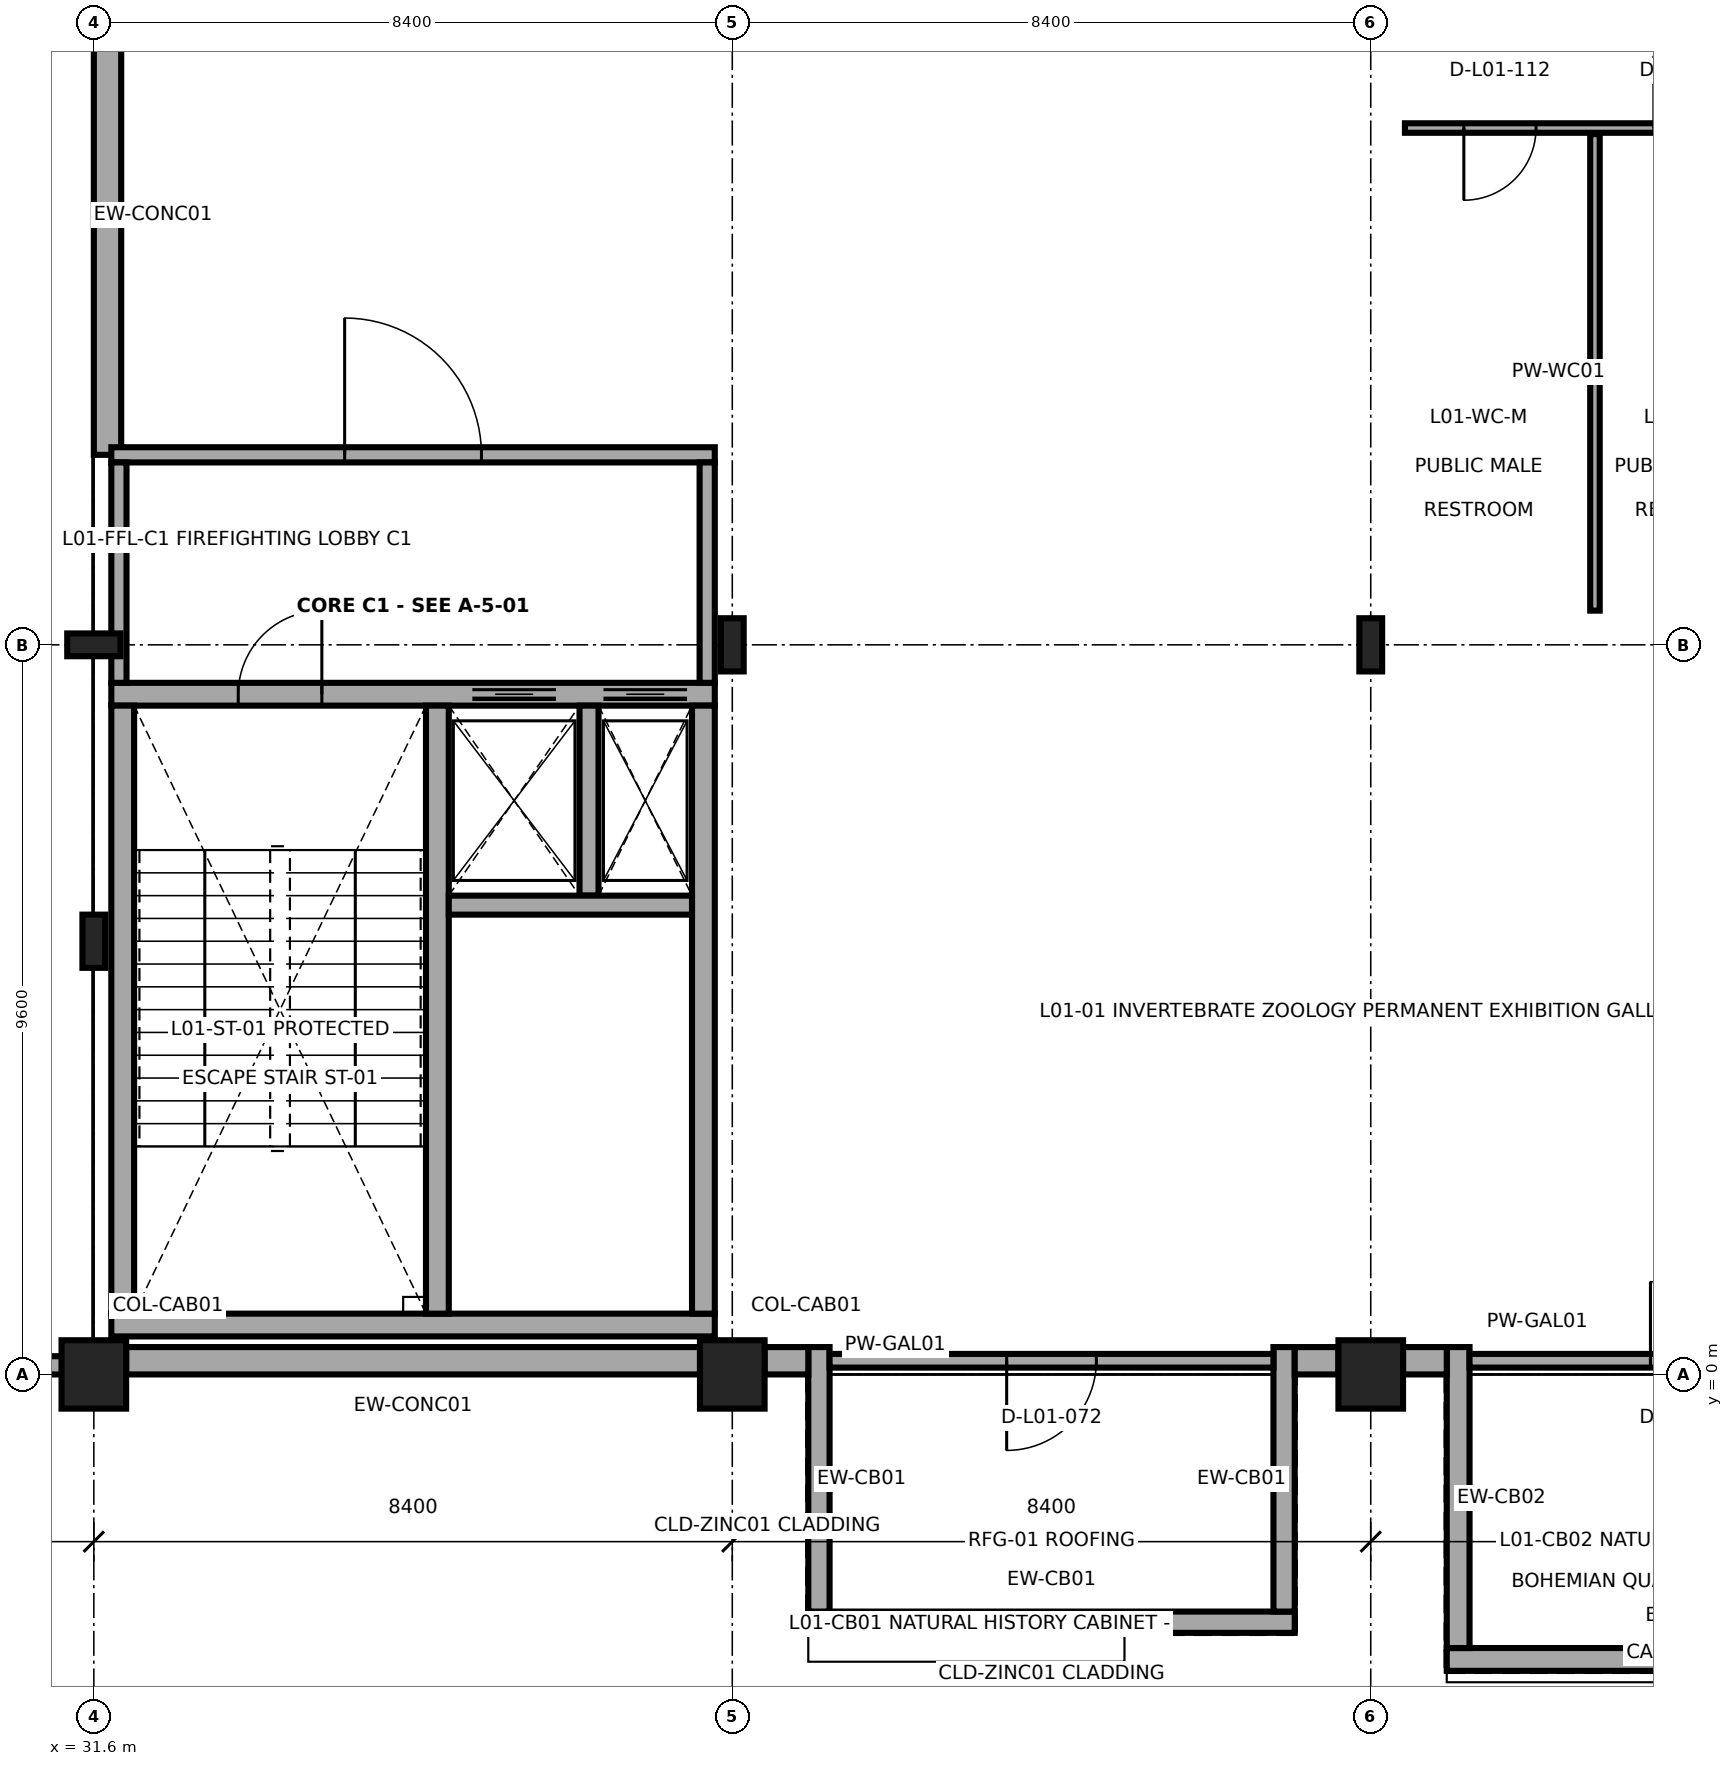
"""IFC4 building model, lengths in metres.
Left out: names, types, materials, properties, quantities, classifications, styles, units other than length and angle.
Written with IfcOpenShell. Run it as: python <this file> out.ifc"""

import sys

from ifc_helpers import new_model, si_unit, direction, frame, frame_2d, origin, origin_2d, place, context, subcontext, project, spatial, rectangle, i_section, extrude, element, fill, save


model = new_model("IFC4")
c1 = context("Model", 3, precision=1e-05, world=origin(), true_north=direction((0.0, 1.0)))
c2 = subcontext(c1, "Body", "Model", "MODEL_VIEW")
j1 = project(units=[si_unit("LENGTHUNIT", "METRE"), si_unit("PLANEANGLEUNIT", "RADIAN")], contexts=[c1])
p1 = place(None, origin())
s1 = spatial("IfcSite", under=j1, at=p1, CompositionType="ELEMENT")
p2 = place(p1, origin())
s2 = spatial("IfcBuilding", under=s1, at=p2, CompositionType="ELEMENT")
p3 = place(p2, frame((0.0, 0.0, 8.4)))
s3 = spatial("IfcBuildingStorey", under=s2, at=p3, CompositionType="ELEMENT", Elevation=8.4)
p4 = place(p3, frame((31.6, 0.0, 0.0), z_axis=(0.0, 0.0, 1.0), x_axis=(1.0, 0.0, 0.0)))
e1 = element("IfcColumn", 1, at=p4, inside=s3, PredefinedType="COLUMN", context=c2, shape_type="SweptSolid", body=[
    extrude(rectangle(XDim=0.85, YDim=0.9, at=origin_2d()), origin(), (0.0, 0.0, 1.0), 4.5),
])
p5 = place(p3, frame((31.6, 9.6, 0.0), z_axis=(0.0, 0.0, 1.0), x_axis=(0.0, 1.0, 0.0)))
e2 = element("IfcColumn", 2, at=p5, inside=s3, PredefinedType="COLUMN", context=c2, shape_type="SweptSolid", body=[
    extrude(i_section(OverallWidth=0.3, OverallDepth=0.7, WebThickness=0.017, FlangeThickness=0.032, FilletRadius=0.027, at=origin_2d()), origin(), (0.0, 0.0, 1.0), 4.5),
])
p6 = place(p3, frame((40.0, 0.0, 0.0), z_axis=(0.0, 0.0, 1.0), x_axis=(1.0, 0.0, 0.0)))
e3 = element("IfcColumn", 3, at=p6, inside=s3, PredefinedType="COLUMN", context=c2, shape_type="SweptSolid", body=[
    extrude(rectangle(XDim=0.85, YDim=0.9, at=origin_2d()), origin(), (0.0, 0.0, 1.0), 4.5),
])
p7 = place(p3, frame((40.0, 9.6, 0.0), z_axis=(0.0, 0.0, 1.0), x_axis=(1.0, 0.0, 0.0)))
e4 = element("IfcColumn", 4, at=p7, inside=s3, PredefinedType="COLUMN", context=c2, shape_type="SweptSolid", body=[
    extrude(i_section(OverallWidth=0.3, OverallDepth=0.7, WebThickness=0.017, FlangeThickness=0.032, FilletRadius=0.027, at=origin_2d()), origin(), (0.0, 0.0, 1.0), 4.5),
])
p8 = place(p3, frame((48.4, 0.0, 0.0), z_axis=(0.0, 0.0, 1.0), x_axis=(1.0, 0.0, 0.0)))
e5 = element("IfcColumn", 5, at=p8, inside=s3, PredefinedType="COLUMN", context=c2, shape_type="SweptSolid", body=[
    extrude(rectangle(XDim=0.85, YDim=0.9, at=origin_2d()), origin(), (0.0, 0.0, 1.0), 4.5),
])
for number, where, z_axis, x_axis in (
    (6, (48.4, 9.6, 0.0), (0.0, 0.0, 1.0), (1.0, 0.0, 0.0)),
    (7, (31.6, 5.7, 0.0), (0.0, 0.0, 1.0), (1.0, 0.0, 0.0)),
):
    element("IfcColumn", number, at=place(p3, frame(where, z_axis=z_axis, x_axis=x_axis)), inside=s3, PredefinedType="COLUMN", context=c2, shape_type="SweptSolid", body=[
        extrude(i_section(OverallWidth=0.3, OverallDepth=0.7, WebThickness=0.017, FlangeThickness=0.032, FilletRadius=0.027, at=origin_2d()), origin(), (0.0, 0.0, 1.0), 4.5),
    ])
p9 = place(p3, frame((41.0, -3.26, 0.0), z_axis=(0.0, 0.0, 1.0), x_axis=(1.0, 0.0, 0.0)))
e8 = element("IfcWall", 8, at=p9, inside=s3, PredefinedType="SOLIDWALL", context=c2, shape_type="SweptSolid", body=[
    extrude(rectangle(XDim=6.4, YDim=0.28, at=frame_2d((3.2, 0.0))), origin(), (0.0, 0.0, 1.0), 2.99),
])
for number, where, z_axis, x_axis in (
    (9, (41.14, 0.36, 0.0), (0.0, 0.0, 1.0), (0.0, -1.0, 0.0)),
    (10, (47.26, -3.12, 0.0), (0.0, 0.0, 1.0), (0.0, 1.0, 0.0)),
):
    element("IfcWall", number, at=place(p3, frame(where, z_axis=z_axis, x_axis=x_axis)), inside=s3, PredefinedType="SOLIDWALL", context=c2, shape_type="SweptSolid", body=[
        extrude(rectangle(XDim=3.48, YDim=0.28, at=frame_2d((1.74, 0.0))), origin(), (0.0, 0.0, 1.0), 2.99),
    ])
p10 = place(p3, frame((49.4, -3.75, 0.0), z_axis=(0.0, 0.0, 1.0), x_axis=(1.0, 0.0, 0.0)))
e11 = element("IfcWall", 11, at=p10, inside=s3, PredefinedType="SOLIDWALL", context=c2, shape_type="SweptSolid", body=[
    extrude(rectangle(XDim=6.4, YDim=0.3, at=frame_2d((3.2, 0.0))), origin(), (0.0, 0.0, 1.0), 2.99),
])
p11 = place(p3, frame((49.55, 0.36, 0.0), z_axis=(0.0, 0.0, 1.0), x_axis=(0.0, -1.0, 0.0)))
e12 = element("IfcWall", 12, at=p11, inside=s3, PredefinedType="SOLIDWALL", context=c2, shape_type="SweptSolid", body=[
    extrude(rectangle(XDim=3.96, YDim=0.3, at=frame_2d((1.98, 0.0))), origin(), (0.0, 0.0, 1.0), 2.99),
])
p12 = place(p3, frame((32.025, 0.18, 0.0), z_axis=(0.0, 0.0, 1.0), x_axis=(1.0, 0.0, 0.0)))
e13 = element("IfcWall", 13, at=p12, inside=s3, PredefinedType="SOLIDWALL", context=c2, shape_type="SweptSolid", body=[
    extrude(rectangle(XDim=7.55, YDim=0.36, at=frame_2d((3.775, 0.0))), origin(), (0.0, 0.0, 1.0), 3.335),
])
p13 = place(p3, frame((40.425, 0.18, 0.0), z_axis=(0.0, 0.0, 1.0), x_axis=(1.0, 0.0, 0.0)))
e14 = element("IfcWall", 14, at=p13, inside=s3, PredefinedType="SOLIDWALL", context=c2, shape_type="SweptSolid", body=[
    extrude(rectangle(XDim=0.575, YDim=0.36, at=frame_2d((0.288, 0.0))), origin(), (0.0, 0.0, 1.0), 3.335),
])
p14 = place(p3, frame((47.4, 0.18, 0.0), z_axis=(0.0, 0.0, 1.0), x_axis=(1.0, 0.0, 0.0)))
e15 = element("IfcWall", 15, at=p14, inside=s3, PredefinedType="SOLIDWALL", context=c2, shape_type="SweptSolid", body=[
    extrude(rectangle(XDim=0.575, YDim=0.36, at=frame_2d((0.288, 0.0))), origin(), (0.0, 0.0, 1.0), 3.335),
])
p15 = place(p3, frame((48.825, 0.18, 0.0), z_axis=(0.0, 0.0, 1.0), x_axis=(1.0, 0.0, 0.0)))
e16 = element("IfcWall", 16, at=p15, inside=s3, PredefinedType="SOLIDWALL", context=c2, shape_type="SweptSolid", body=[
    extrude(rectangle(XDim=0.575, YDim=0.36, at=frame_2d((0.288, 0.0))), origin(), (0.0, 0.0, 1.0), 3.335),
])
p16 = place(p3, frame((23.32, 0.12, 0.0), z_axis=(0.0, 0.0, 1.0), x_axis=(1.0, 0.0, 0.0)))
e17 = element("IfcWall", 17, at=p16, inside=s3, PredefinedType="PARAPET", context=c2, shape_type="SweptSolid", body=[
    extrude(rectangle(XDim=7.93, YDim=0.24, at=frame_2d((3.965, 0.0))), origin(), (0.0, 0.0, 1.0), 0.95),
])
p17 = place(p3, frame((31.78, 18.75, 0.0), z_axis=(0.0, 0.0, 1.0), x_axis=(0.0, -1.0, 0.0)))
e18 = element("IfcWall", 18, at=p17, inside=s3, PredefinedType="SOLIDWALL", context=c2, shape_type="SweptSolid", body=[
    extrude(rectangle(XDim=6.65, YDim=0.36, at=frame_2d((3.325, 0.0))), origin(), (0.0, 0.0, 1.0), 3.532),
])
p18 = place(p3, frame((31.83, 0.65, 0.0), z_axis=(0.0, 0.0, 1.0), x_axis=(1.0, 0.0, 0.0)))
e19 = element("IfcWall", 19, at=p18, inside=s3, PredefinedType="SHEAR", context=c2, shape_type="SweptSolid", body=[
    extrude(rectangle(XDim=7.94, YDim=0.3, at=frame_2d((3.97, 0.0))), origin(), (0.0, 0.0, 1.0), 4.25),
])
p19 = place(p3, frame((39.77, 8.95, 0.0), z_axis=(0.0, 0.0, 1.0), x_axis=(-1.0, 0.0, 0.0)))
e20 = element("IfcWall", 20, at=p19, inside=s3, PredefinedType="SHEAR", context=c2, shape_type="SweptSolid", body=[
    extrude(rectangle(XDim=7.94, YDim=0.3, at=frame_2d((3.97, 0.0))), origin(), (0.0, 0.0, 1.0), 4.25),
])
p20 = place(p19, frame((5.17, 0.0, 0.0)))
e21 = element("IfcOpeningElement", 21, at=p20, cuts=e20, PredefinedType="OPENING", context=c2, shape_type="SweptSolid", body=[
    extrude(rectangle(XDim=1.1, YDim=2.2, at=frame_2d((0.55, 1.1))), frame((0.0, 0.16, 0.0), z_axis=(0.0, -1.0, 0.0), x_axis=(1.0, 0.0, 0.0)), (0.0, 0.0, 1.0), 0.32),
])
p21 = place(p19, frame((2.09, 0.0, 0.0)))
e22 = element("IfcOpeningElement", 22, at=p21, cuts=e20, PredefinedType="OPENING", context=c2, shape_type="SweptSolid", body=[
    extrude(rectangle(XDim=1.1, YDim=2.1, at=frame_2d((0.55, 1.05))), frame((0.0, 0.16, 0.0), z_axis=(0.0, -1.0, 0.0), x_axis=(1.0, 0.0, 0.0)), (0.0, 0.0, 1.0), 0.32),
])
p22 = place(p19, frame((0.365, 0.0, 0.0)))
e23 = element("IfcOpeningElement", 23, at=p22, cuts=e20, PredefinedType="OPENING", context=c2, shape_type="SweptSolid", body=[
    extrude(rectangle(XDim=1.1, YDim=2.1, at=frame_2d((0.55, 1.05))), frame((0.0, 0.16, 0.0), z_axis=(0.0, -1.0, 0.0), x_axis=(1.0, 0.0, 0.0)), (0.0, 0.0, 1.0), 0.32),
])
for number, where, z_axis, x_axis in (
    (24, (31.98, 8.8, 0.0), (0.0, 0.0, 1.0), (0.0, -1.0, 0.0)),
    (25, (39.62, 0.8, 0.0), (0.0, 0.0, 1.0), (0.0, 1.0, 0.0)),
    (26, (36.12, 0.8, 0.0), (0.0, 0.0, 1.0), (0.0, 1.0, 0.0)),
):
    element("IfcWall", number, at=place(p3, frame(where, z_axis=z_axis, x_axis=x_axis)), inside=s3, PredefinedType="SHEAR", context=c2, shape_type="SweptSolid", body=[
        extrude(rectangle(XDim=8.0, YDim=0.3, at=frame_2d((4.0, 0.0))), origin(), (0.0, 0.0, 1.0), 4.25),
    ])
p23 = place(p3, frame((38.115, 6.3, 0.0), z_axis=(0.0, 0.0, 1.0), x_axis=(0.0, 1.0, 0.0)))
e27 = element("IfcWall", 27, at=p23, inside=s3, PredefinedType="SHEAR", context=c2, shape_type="SweptSolid", body=[
    extrude(rectangle(XDim=2.5, YDim=0.25, at=frame_2d((1.25, 0.0))), origin(), (0.0, 0.0, 1.0), 4.25),
])
p24 = place(p3, frame((36.27, 6.175, 0.0), z_axis=(0.0, 0.0, 1.0), x_axis=(1.0, 0.0, 0.0)))
e28 = element("IfcWall", 28, at=p24, inside=s3, PredefinedType="SHEAR", context=c2, shape_type="SweptSolid", body=[
    extrude(rectangle(XDim=3.2, YDim=0.25, at=frame_2d((1.6, 0.0))), origin(), (0.0, 0.0, 1.0), 4.25),
])
p25 = place(p3, frame((31.83, 12.1, 0.0), z_axis=(0.0, 0.0, 1.0), x_axis=(1.0, 0.0, 0.0)))
e29 = element("IfcWall", 29, at=p25, inside=s3, PredefinedType="SOLIDWALL", context=c2, shape_type="SweptSolid", body=[
    extrude(rectangle(XDim=7.94, YDim=0.2, at=frame_2d((3.97, 0.0))), origin(), (0.0, 0.0, 1.0), 3.532),
])
p26 = place(p25, frame((3.07, 0.0, 0.0)))
e30 = element("IfcOpeningElement", 30, at=p26, cuts=e29, PredefinedType="OPENING", context=c2, shape_type="SweptSolid", body=[
    extrude(rectangle(XDim=1.8, YDim=2.2, at=frame_2d((0.9, 1.1))), frame((0.0, 0.11, 0.0), z_axis=(0.0, -1.0, 0.0), x_axis=(1.0, 0.0, 0.0)), (0.0, 0.0, 1.0), 0.22),
])
for number, where, z_axis, x_axis in (
    (31, (31.93, 9.1, 0.0), (0.0, 0.0, 1.0), (0.0, 1.0, 0.0)),
    (32, (39.67, 12.0, 0.0), (0.0, 0.0, 1.0), (0.0, -1.0, 0.0)),
):
    element("IfcWall", number, at=place(p3, frame(where, z_axis=z_axis, x_axis=x_axis)), inside=s3, PredefinedType="SOLIDWALL", context=c2, shape_type="SweptSolid", body=[
        extrude(rectangle(XDim=2.9, YDim=0.2, at=frame_2d((1.45, 0.0))), origin(), (0.0, 0.0, 1.0), 3.592),
    ])
p27 = place(p3, frame((41.28, 0.18, 0.0), z_axis=(0.0, 0.0, 1.0), x_axis=(1.0, 0.0, 0.0)))
e33 = element("IfcWall", 33, at=p27, inside=s3, PredefinedType="PARTITIONING", context=c2, shape_type="SweptSolid", body=[
    extrude(rectangle(XDim=5.84, YDim=0.18, at=frame_2d((2.92, 0.0))), origin(), (0.0, 0.0, 1.0), 2.99),
])
p28 = place(p27, frame((2.33, 0.0, 0.0)))
e34 = element("IfcOpeningElement", 34, at=p28, cuts=e33, PredefinedType="OPENING", context=c2, shape_type="SweptSolid", body=[
    extrude(rectangle(XDim=1.18, YDim=2.25, at=frame_2d((0.59, 1.125))), frame((0.0, 0.1, 0.0), z_axis=(0.0, -1.0, 0.0), x_axis=(1.0, 0.0, 0.0)), (0.0, 0.0, 1.0), 0.2),
])
p29 = place(p3, frame((49.7, 0.18, 0.0), z_axis=(0.0, 0.0, 1.0), x_axis=(1.0, 0.0, 0.0)))
e35 = element("IfcWall", 35, at=p29, inside=s3, PredefinedType="PARTITIONING", context=c2, shape_type="SweptSolid", body=[
    extrude(rectangle(XDim=5.8, YDim=0.18, at=frame_2d((2.9, 0.0))), origin(), (0.0, 0.0, 1.0), 2.99),
])
p30 = place(p29, frame((2.38, 0.0, 0.0)))
e36 = element("IfcOpeningElement", 36, at=p30, cuts=e35, PredefinedType="OPENING", context=c2, shape_type="SweptSolid", body=[
    extrude(rectangle(XDim=1.04, YDim=2.18, at=frame_2d((0.52, 1.09))), frame((0.0, 0.1, 0.0), z_axis=(0.0, -1.0, 0.0), x_axis=(1.0, 0.0, 0.0)), (0.0, 0.0, 1.0), 0.2),
])
p31 = place(p3, frame((48.85, 16.4, 0.0), z_axis=(0.0, 0.0, 1.0), x_axis=(1.0, 0.0, 0.0)))
e37 = element("IfcWall", 37, at=p31, inside=s3, PredefinedType="PARTITIONING", context=c2, shape_type="SweptSolid", body=[
    extrude(rectangle(XDim=7.5, YDim=0.125, at=frame_2d((3.75, 0.0))), origin(), (0.0, 0.0, 1.0), 3.902),
])
p32 = place(p31, frame((0.775, 0.0, 0.0)))
e38 = element("IfcOpeningElement", 38, at=p32, cuts=e37, PredefinedType="OPENING", context=c2, shape_type="SweptSolid", body=[
    extrude(rectangle(XDim=0.95, YDim=2.1, at=frame_2d((0.475, 1.05))), frame((0.0, 0.073, 0.0), z_axis=(0.0, -1.0, 0.0), x_axis=(1.0, 0.0, 0.0)), (0.0, 0.0, 1.0), 0.145),
])
p33 = place(p31, frame((3.275, 0.0, 0.0)))
e39 = element("IfcOpeningElement", 39, at=p33, cuts=e37, PredefinedType="OPENING", context=c2, shape_type="SweptSolid", body=[
    extrude(rectangle(XDim=0.95, YDim=2.1, at=frame_2d((0.475, 1.05))), frame((0.0, 0.073, 0.0), z_axis=(0.0, -1.0, 0.0), x_axis=(1.0, 0.0, 0.0)), (0.0, 0.0, 1.0), 0.145),
])
p34 = place(p31, frame((5.775, 0.0, 0.0)))
e40 = element("IfcOpeningElement", 40, at=p34, cuts=e37, PredefinedType="OPENING", context=c2, shape_type="SweptSolid", body=[
    extrude(rectangle(XDim=1.0, YDim=2.12, at=frame_2d((0.5, 1.06))), frame((0.0, 0.073, 0.0), z_axis=(0.0, -1.0, 0.0), x_axis=(1.0, 0.0, 0.0)), (0.0, 0.0, 1.0), 0.145),
])
p35 = place(p3, frame((51.35, 10.05, 0.0), z_axis=(0.0, 0.0, 1.0), x_axis=(0.0, 1.0, 0.0)))
e41 = element("IfcWall", 41, at=p35, inside=s3, PredefinedType="PARTITIONING", context=c2, shape_type="SweptSolid", body=[
    extrude(rectangle(XDim=6.27, YDim=0.125, at=frame_2d((3.135, 0.0))), origin(), (0.0, 0.0, 1.0), 4.23),
])
p36 = place(p20, origin())
e42 = element("IfcDoor", 42, at=p36, inside=s3, OperationType="SINGLE_SWING_RIGHT", PredefinedType="DOOR", context=c2, shape_type="SweptSolid", body=[
    extrude(rectangle(XDim=1.1, YDim=2.2, at=frame_2d((0.55, 1.1))), frame((0.0, 0.025, 0.0), z_axis=(0.0, -1.0, 0.0), x_axis=(1.0, 0.0, 0.0)), (0.0, 0.0, 1.0), 0.05),
])
fill(e21, e42)
p37 = place(p21, origin())
e43 = element("IfcDoor", 43, at=p37, inside=s3, OperationType="SLIDING_TO_LEFT", PredefinedType="DOOR", context=c2, shape_type="SweptSolid", body=[
    extrude(rectangle(XDim=1.1, YDim=2.1, at=frame_2d((0.55, 1.05))), frame((0.0, 0.025, 0.0), z_axis=(0.0, -1.0, 0.0), x_axis=(1.0, 0.0, 0.0)), (0.0, 0.0, 1.0), 0.05),
])
fill(e22, e43)
p38 = place(p22, origin())
e44 = element("IfcDoor", 44, at=p38, inside=s3, OperationType="SLIDING_TO_LEFT", PredefinedType="DOOR", context=c2, shape_type="SweptSolid", body=[
    extrude(rectangle(XDim=1.1, YDim=2.1, at=frame_2d((0.55, 1.05))), frame((0.0, 0.025, 0.0), z_axis=(0.0, -1.0, 0.0), x_axis=(1.0, 0.0, 0.0)), (0.0, 0.0, 1.0), 0.05),
])
fill(e23, e44)
p39 = place(p26, origin())
e45 = element("IfcDoor", 45, at=p39, inside=s3, OperationType="DOUBLE_DOOR_SINGLE_SWING", PredefinedType="DOOR", context=c2, shape_type="SweptSolid", body=[
    extrude(rectangle(XDim=1.8, YDim=2.2, at=frame_2d((0.9, 1.1))), frame((0.0, 0.025, 0.0), z_axis=(0.0, -1.0, 0.0), x_axis=(1.0, 0.0, 0.0)), (0.0, 0.0, 1.0), 0.05),
])
fill(e30, e45)
p40 = place(p28, origin())
e46 = element("IfcDoor", 46, at=p40, inside=s3, OperationType="SINGLE_SWING_RIGHT", PredefinedType="DOOR", context=c2, shape_type="SweptSolid", body=[
    extrude(rectangle(XDim=1.18, YDim=2.25, at=frame_2d((0.59, 1.125))), frame((0.0, 0.025, 0.0), z_axis=(0.0, -1.0, 0.0), x_axis=(1.0, 0.0, 0.0)), (0.0, 0.0, 1.0), 0.05),
])
fill(e34, e46)
p41 = place(p30, origin())
e47 = element("IfcDoor", 47, at=p41, inside=s3, OperationType="SINGLE_SWING_LEFT", PredefinedType="DOOR", context=c2, shape_type="SweptSolid", body=[
    extrude(rectangle(XDim=1.04, YDim=2.18, at=frame_2d((0.52, 1.09))), frame((0.0, 0.025, 0.0), z_axis=(0.0, -1.0, 0.0), x_axis=(1.0, 0.0, 0.0)), (0.0, 0.0, 1.0), 0.05),
])
fill(e36, e47)
p42 = place(p32, frame((0.95, 0.0, 0.0), z_axis=(0.0, 0.0, 1.0), x_axis=(-1.0, 0.0, 0.0)))
e48 = element("IfcDoor", 48, at=p42, inside=s3, OperationType="SINGLE_SWING_RIGHT", PredefinedType="DOOR", context=c2, shape_type="SweptSolid", body=[
    extrude(rectangle(XDim=0.95, YDim=2.1, at=frame_2d((0.475, 1.05))), frame((0.0, 0.025, 0.0), z_axis=(0.0, -1.0, 0.0), x_axis=(1.0, 0.0, 0.0)), (0.0, 0.0, 1.0), 0.05),
])
fill(e38, e48)
save(model, sys.argv[1])
